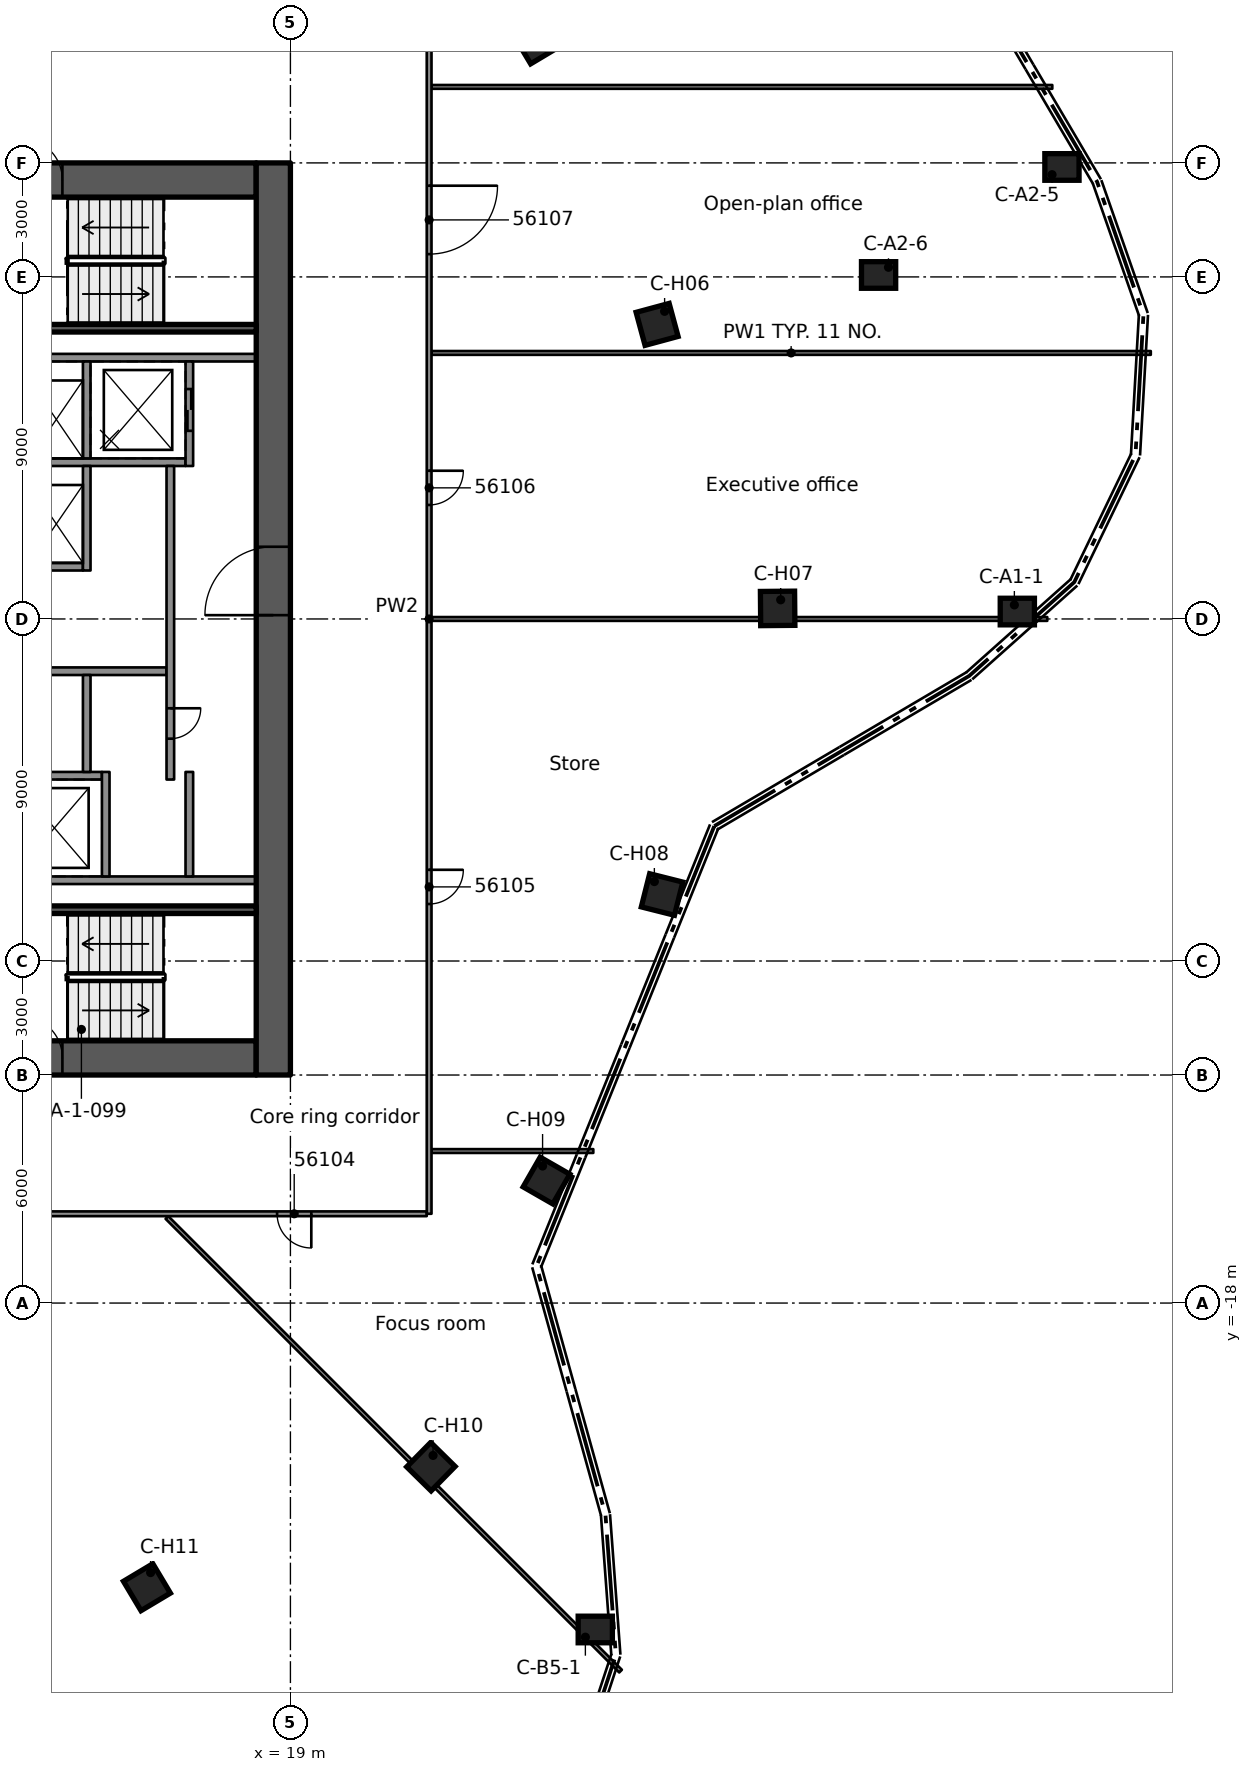
"""IFC4 building model, lengths in metres.
Left out: names, types, materials, properties, quantities, classifications, styles, units other than length and angle.
Written with IfcOpenShell. Run it as: python <this file> out.ifc"""

import sys

from ifc_helpers import new_model, si_unit, direction, frame, frame_2d, origin, origin_2d, place, context, subcontext, project, spatial, rectangle, extrude, element, fill, save


model = new_model("IFC4")
c1 = context("Model", 3, precision=1e-05, world=origin(), true_north=direction((0.0, 1.0)))
c2 = subcontext(c1, "Body", "Model", "MODEL_VIEW")
j1 = project(units=[si_unit("LENGTHUNIT", "METRE"), si_unit("PLANEANGLEUNIT", "RADIAN")], contexts=[c1])
p1 = place(None, origin())
s1 = spatial("IfcSite", under=j1, at=p1, CompositionType="ELEMENT")
p2 = place(p1, origin())
s2 = spatial("IfcBuilding", under=s1, at=p2, CompositionType="ELEMENT")
p3 = place(p2, frame((0.0, 0.0, 278.9)))
s3 = spatial("IfcBuildingStorey", under=s2, at=p3, CompositionType="ELEMENT", Elevation=278.9)
p4 = place(p3, frame((8.9, 11.55, 0.0), z_axis=(0.0, 0.0, 1.0), x_axis=(1.0, 0.0, 0.0)))
e1 = element("IfcWall", 1, at=p4, inside=s3, PredefinedType="SHEAR", context=c2, shape_type="SweptSolid", body=[
    extrude(rectangle(XDim=9.2, YDim=0.9, at=frame_2d((4.6, 0.0))), origin(), (0.0, 0.0, 1.0), 3.5),
])
p5 = place(p4, frame((3.0, 0.0, 0.0)))
e2 = element("IfcOpeningElement", 2, at=p5, cuts=e1, PredefinedType="OPENING", context=c2, shape_type="SweptSolid", body=[
    extrude(rectangle(XDim=1.1, YDim=2.1, at=frame_2d((0.55, 1.05))), frame((0.0, 0.46, 0.0), z_axis=(0.0, -1.0, 0.0), x_axis=(1.0, 0.0, 0.0)), (0.0, 0.0, 1.0), 0.92),
])
p6 = place(p3, frame((8.9, -11.55, 0.0), z_axis=(0.0, 0.0, 1.0), x_axis=(1.0, 0.0, 0.0)))
e3 = element("IfcWall", 3, at=p6, inside=s3, PredefinedType="SHEAR", context=c2, shape_type="SweptSolid", body=[
    extrude(rectangle(XDim=9.2, YDim=0.9, at=frame_2d((4.6, 0.0))), origin(), (0.0, 0.0, 1.0), 3.5),
])
p7 = place(p6, frame((3.0, 0.0, 0.0)))
e4 = element("IfcOpeningElement", 4, at=p7, cuts=e3, PredefinedType="OPENING", context=c2, shape_type="SweptSolid", body=[
    extrude(rectangle(XDim=1.1, YDim=2.1, at=frame_2d((0.55, 1.05))), frame((0.0, 0.46, 0.0), z_axis=(0.0, -1.0, 0.0), x_axis=(1.0, 0.0, 0.0)), (0.0, 0.0, 1.0), 0.92),
])
p8 = place(p3, frame((18.55, -12.0, 0.0), z_axis=(0.0, 0.0, 1.0), x_axis=(0.0, 1.0, 0.0)))
e5 = element("IfcWall", 5, at=p8, inside=s3, PredefinedType="SHEAR", context=c2, shape_type="SweptSolid", body=[
    extrude(rectangle(XDim=24.0, YDim=0.9, at=frame_2d((12.0, 0.0))), origin(), (0.0, 0.0, 1.0), 3.5),
])
p9 = place(p8, frame((12.1, 0.0, 0.0)))
e6 = element("IfcOpeningElement", 6, at=p9, cuts=e5, PredefinedType="OPENING", context=c2, shape_type="SweptSolid", body=[
    extrude(rectangle(XDim=1.8, YDim=2.1, at=frame_2d((0.9, 1.05))), frame((0.0, 0.46, 0.0), z_axis=(0.0, -1.0, 0.0), x_axis=(1.0, 0.0, 0.0)), (0.0, 0.0, 1.0), 0.92),
])
for number, where, z_axis, x_axis in (
    (7, (38.128, 0.195, 0.0), (0.0, 0.0, 1.0), (1.0, 0.0, 0.0)),
    (8, (39.302, 11.893, 0.0), (0.0, 0.0, 1.0), (1.0, 0.0, 0.0)),
    (9, (34.477, 9.051, 0.0), (0.0, 0.0, 1.0), (1.0, 0.0, 0.0)),
    (10, (27.022, -26.589, 0.0), (0.0, 0.0, 1.0), (1.0, 0.0, 0.0)),
):
    element("IfcColumn", number, at=place(p3, frame(where, z_axis=z_axis, x_axis=x_axis)), inside=s3, PredefinedType="COLUMN", context=c2, shape_type="SweptSolid", body=[
        extrude(rectangle(XDim=0.9, YDim=0.7, at=origin_2d()), origin(), (0.0, 0.0, 1.0), 3.5),
    ])
for number, where, z_axis, x_axis in (
    (11, (25.477, 15.224, 0.0), (0.0, 0.0, 1.0), (0.858, 0.513, 0.0)),
    (12, (28.649, 7.751, 0.0), (0.0, 0.0, 1.0), (0.965, 0.261, 0.0)),
    (13, (31.821, 0.278, 0.0), (0.0, 0.0, 1.0), (1.0, 0.009, 0.0)),
    (14, (28.78, -7.25, 0.0), (0.0, 0.0, 1.0), (0.97, -0.244, 0.0)),
    (15, (25.739, -14.777, 0.0), (0.0, 0.0, 1.0), (0.867, -0.498, 0.0)),
    (16, (22.697, -22.305, 0.0), (0.0, 0.0, 1.0), (0.713, -0.701, 0.0)),
    (17, (15.224, -25.477, 0.0), (0.0, 0.0, 1.0), (0.513, -0.858, 0.0)),
):
    element("IfcColumn", number, at=place(p3, frame(where, z_axis=z_axis, x_axis=x_axis)), inside=s3, PredefinedType="COLUMN", context=c2, shape_type="SweptSolid", body=[
        extrude(rectangle(XDim=0.9, YDim=0.9, at=origin_2d()), origin(), (0.0, 0.0, 1.0), 3.5),
    ])
for number, where, z_axis, x_axis in (
    (18, (11.54, -6.875, 0.0), (0.0, 0.0, 1.0), (1.0, 0.0, 0.0)),
    (19, (11.54, 6.875, 0.0), (0.0, 0.0, 1.0), (1.0, 0.0, 0.0)),
):
    element("IfcWall", number, at=place(p3, frame(where, z_axis=z_axis, x_axis=x_axis)), inside=s3, PredefinedType="SOLIDWALL", context=c2, shape_type="SweptSolid", body=[
        extrude(rectangle(XDim=6.56, YDim=0.2, at=frame_2d((3.28, 0.0))), origin(), (0.0, 0.0, 1.0), 3.09),
    ])
p10 = place(p3, frame((11.54, 4.125, 0.0), z_axis=(0.0, 0.0, 1.0), x_axis=(1.0, 0.0, 0.0)))
e20 = element("IfcWall", 20, at=p10, inside=s3, PredefinedType="SOLIDWALL", context=c2, shape_type="SweptSolid", body=[
    extrude(rectangle(XDim=4.7, YDim=0.2, at=frame_2d((2.35, 0.0))), origin(), (0.0, 0.0, 1.0), 3.09),
])
p11 = place(p3, frame((11.54, 1.375, 0.0), z_axis=(0.0, 0.0, 1.0), x_axis=(1.0, 0.0, 0.0)))
e21 = element("IfcWall", 21, at=p11, inside=s3, PredefinedType="SOLIDWALL", context=c2, shape_type="SweptSolid", body=[
    extrude(rectangle(XDim=2.0, YDim=0.2, at=frame_2d((1.0, 0.0))), origin(), (0.0, 0.0, 1.0), 3.09),
])
p12 = place(p3, frame((11.54, -1.375, 0.0), z_axis=(0.0, 0.0, 1.0), x_axis=(1.0, 0.0, 0.0)))
e22 = element("IfcWall", 22, at=p12, inside=s3, PredefinedType="SOLIDWALL", context=c2, shape_type="SweptSolid", body=[
    extrude(rectangle(XDim=4.2, YDim=0.2, at=frame_2d((2.1, 0.0))), origin(), (0.0, 0.0, 1.0), 3.09),
])
p13 = place(p3, frame((11.54, -4.125, 0.0), z_axis=(0.0, 0.0, 1.0), x_axis=(1.0, 0.0, 0.0)))
e23 = element("IfcWall", 23, at=p13, inside=s3, PredefinedType="SOLIDWALL", context=c2, shape_type="SweptSolid", body=[
    extrude(rectangle(XDim=2.5, YDim=0.2, at=frame_2d((1.25, 0.0))), origin(), (0.0, 0.0, 1.0), 3.09),
])
p14 = place(p3, frame((13.64, 6.775, 0.0), z_axis=(0.0, 0.0, 1.0), x_axis=(0.0, -1.0, 0.0)))
e24 = element("IfcWall", 24, at=p14, inside=s3, PredefinedType="SOLIDWALL", context=c2, shape_type="SweptSolid", body=[
    extrude(rectangle(XDim=2.55, YDim=0.2, at=frame_2d((1.275, 0.0))), origin(), (0.0, 0.0, 1.0), 3.09),
])
p15 = place(p3, frame((13.64, 4.025, 0.0), z_axis=(0.0, 0.0, 1.0), x_axis=(0.0, -1.0, 0.0)))
e25 = element("IfcWall", 25, at=p15, inside=s3, PredefinedType="SOLIDWALL", context=c2, shape_type="SweptSolid", body=[
    extrude(rectangle(XDim=2.75, YDim=0.2, at=frame_2d((1.375, 0.0))), origin(), (0.0, 0.0, 1.0), 3.09),
])
p16 = place(p3, frame((13.64, -1.475, 0.0), z_axis=(0.0, 0.0, 1.0), x_axis=(0.0, -1.0, 0.0)))
e26 = element("IfcWall", 26, at=p16, inside=s3, PredefinedType="SOLIDWALL", context=c2, shape_type="SweptSolid", body=[
    extrude(rectangle(XDim=2.55, YDim=0.2, at=frame_2d((1.275, 0.0))), origin(), (0.0, 0.0, 1.0), 3.09),
])
p17 = place(p3, frame((14.14, -4.025, 0.0), z_axis=(0.0, 0.0, 1.0), x_axis=(0.0, -1.0, 0.0)))
e27 = element("IfcWall", 27, at=p17, inside=s3, PredefinedType="SOLIDWALL", context=c2, shape_type="SweptSolid", body=[
    extrude(rectangle(XDim=2.75, YDim=0.2, at=frame_2d((1.375, 0.0))), origin(), (0.0, 0.0, 1.0), 3.09),
])
p18 = place(p3, frame((16.34, 6.775, 0.0), z_axis=(0.0, 0.0, 1.0), x_axis=(0.0, -1.0, 0.0)))
e28 = element("IfcWall", 28, at=p18, inside=s3, PredefinedType="SOLIDWALL", context=c2, shape_type="SweptSolid", body=[
    extrude(rectangle(XDim=2.75, YDim=0.2, at=frame_2d((1.375, 0.0))), origin(), (0.0, 0.0, 1.0), 3.09),
])
p19 = place(p18, frame((0.725, 0.0, 0.0)))
e29 = element("IfcOpeningElement", 29, at=p19, cuts=e28, PredefinedType="OPENING", context=c2, shape_type="SweptSolid", body=[
    extrude(rectangle(XDim=1.1, YDim=2.1, at=frame_2d((0.55, 1.05))), frame((0.0, 0.11, 0.0), z_axis=(0.0, -1.0, 0.0), x_axis=(1.0, 0.0, 0.0)), (0.0, 0.0, 1.0), 0.22),
])
p20 = place(p3, frame((15.84, 4.025, 0.0), z_axis=(0.0, 0.0, 1.0), x_axis=(0.0, -1.0, 0.0)))
e30 = element("IfcWall", 30, at=p20, inside=s3, PredefinedType="SOLIDWALL", context=c2, shape_type="SweptSolid", body=[
    extrude(rectangle(XDim=8.25, YDim=0.2, at=frame_2d((4.125, 0.0))), origin(), (0.0, 0.0, 1.0), 3.09),
])
p21 = place(p20, frame((6.375, 0.0, 0.0)))
e31 = element("IfcOpeningElement", 31, at=p21, cuts=e30, PredefinedType="OPENING", context=c2, shape_type="SweptSolid", body=[
    extrude(rectangle(XDim=0.8, YDim=2.1, at=frame_2d((0.4, 1.05))), frame((0.0, 0.11, 0.0), z_axis=(0.0, -1.0, 0.0), x_axis=(1.0, 0.0, 0.0)), (0.0, 0.0, 1.0), 0.22),
])
p22 = place(p3, frame((16.34, -4.025, 0.0), z_axis=(0.0, 0.0, 1.0), x_axis=(0.0, -1.0, 0.0)))
e32 = element("IfcWall", 32, at=p22, inside=s3, PredefinedType="SOLIDWALL", context=c2, shape_type="SweptSolid", body=[
    extrude(rectangle(XDim=2.75, YDim=0.2, at=frame_2d((1.375, 0.0))), origin(), (0.0, 0.0, 1.0), 3.09),
])
for number, where, z_axis, x_axis in (
    (33, (11.54, -7.65, 0.0), (0.0, 0.0, 1.0), (1.0, 0.0, 0.0)),
    (34, (11.54, 7.65, 0.0), (0.0, 0.0, 1.0), (1.0, 0.0, 0.0)),
):
    element("IfcWall", number, at=place(p3, frame(where, z_axis=z_axis, x_axis=x_axis)), inside=s3, PredefinedType="SOLIDWALL", context=c2, shape_type="SweptSolid", body=[
        extrude(rectangle(XDim=6.56, YDim=0.2, at=frame_2d((3.28, 0.0))), origin(), (0.0, 0.0, 1.0), 3.09),
    ])
p23 = place(p3, frame((27.687, -27.685, 0.0), z_axis=(0.0, 0.0, 1.0), x_axis=(-0.70713570585, 0.70707785534, 0.0)))
e35 = element("IfcWall", 35, at=p23, inside=s3, PredefinedType="PARTITIONING", context=c2, shape_type="SweptSolid", body=[
    extrude(rectangle(XDim=16.881, YDim=0.1, at=frame_2d((8.44, 0.0))), origin(), (0.0, 0.0, 1.0), 3.08),
])
p24 = place(p3, frame((22.587, -15.651, 0.0), z_axis=(0.0, 0.0, 1.0), x_axis=(-1.0, 0.0, 0.0)))
e36 = element("IfcWall", 36, at=p24, inside=s3, PredefinedType="PARTITIONING", context=c2, shape_type="SweptSolid", body=[
    extrude(rectangle(XDim=10.996, YDim=0.125, at=frame_2d((5.498, 0.0))), origin(), (0.0, 0.0, 1.0), 3.08),
])
p25 = place(p24, frame((3.038, 0.0, 0.0)))
e37 = element("IfcOpeningElement", 37, at=p25, cuts=e36, PredefinedType="OPENING", context=c2, shape_type="SweptSolid", body=[
    extrude(rectangle(XDim=0.9, YDim=2.1, at=frame_2d((0.45, 1.05))), frame((0.0, 0.073, 0.0), z_axis=(0.0, -1.0, 0.0), x_axis=(1.0, 0.0, 0.0)), (0.0, 0.0, 1.0), 0.145),
])
p26 = place(p3, frame((22.712, -14.0, 0.0), z_axis=(0.0, 0.0, 1.0), x_axis=(1.0, 0.0, 0.0)))
e38 = element("IfcWall", 38, at=p26, inside=s3, PredefinedType="PARTITIONING", context=c2, shape_type="SweptSolid", body=[
    extrude(rectangle(XDim=4.258, YDim=0.1, at=frame_2d((2.129, 0.0))), origin(), (0.0, 0.0, 1.0), 3.08),
])
p27 = place(p3, frame((22.712, 0.0, 0.0), z_axis=(0.0, 0.0, 1.0), x_axis=(1.0, 0.0, 0.0)))
e39 = element("IfcWall", 39, at=p27, inside=s3, PredefinedType="PARTITIONING", context=c2, shape_type="SweptSolid", body=[
    extrude(rectangle(XDim=16.204, YDim=0.1, at=frame_2d((8.102, 0.0))), origin(), (0.0, 0.0, 1.0), 3.08),
])
p28 = place(p3, frame((22.712, 7.0, 0.0), z_axis=(0.0, 0.0, 1.0), x_axis=(1.0, 0.0, 0.0)))
e40 = element("IfcWall", 40, at=p28, inside=s3, PredefinedType="PARTITIONING", context=c2, shape_type="SweptSolid", body=[
    extrude(rectangle(XDim=18.928, YDim=0.1, at=frame_2d((9.464, 0.0))), origin(), (0.0, 0.0, 1.0), 3.08),
])
p29 = place(p3, frame((22.712, 14.0, 0.0), z_axis=(0.0, 0.0, 1.0), x_axis=(1.0, 0.0, 0.0)))
e41 = element("IfcWall", 41, at=p29, inside=s3, PredefinedType="PARTITIONING", context=c2, shape_type="SweptSolid", body=[
    extrude(rectangle(XDim=16.336, YDim=0.1, at=frame_2d((8.168, 0.0))), origin(), (0.0, 0.0, 1.0), 3.08),
])
p30 = place(p3, frame((22.65, 15.651, 0.0), z_axis=(0.0, 0.0, 1.0), x_axis=(0.0, -1.0, 0.0)))
e42 = element("IfcWall", 42, at=p30, inside=s3, PredefinedType="PARTITIONING", context=c2, shape_type="SweptSolid", body=[
    extrude(rectangle(XDim=31.302, YDim=0.125, at=frame_2d((15.651, 0.0))), origin(), (0.0, 0.0, 1.0), 3.08),
])
p31 = place(p30, frame((22.251, 0.0, 0.0)))
e43 = element("IfcOpeningElement", 43, at=p31, cuts=e42, PredefinedType="OPENING", context=c2, shape_type="SweptSolid", body=[
    extrude(rectangle(XDim=0.9, YDim=2.1, at=frame_2d((0.45, 1.05))), frame((0.0, 0.073, 0.0), z_axis=(0.0, -1.0, 0.0), x_axis=(1.0, 0.0, 0.0)), (0.0, 0.0, 1.0), 0.145),
])
p32 = place(p30, frame((11.751, 0.0, 0.0)))
e44 = element("IfcOpeningElement", 44, at=p32, cuts=e42, PredefinedType="OPENING", context=c2, shape_type="SweptSolid", body=[
    extrude(rectangle(XDim=0.9, YDim=2.1, at=frame_2d((0.45, 1.05))), frame((0.0, 0.073, 0.0), z_axis=(0.0, -1.0, 0.0), x_axis=(1.0, 0.0, 0.0)), (0.0, 0.0, 1.0), 0.145),
])
p33 = place(p30, frame((4.251, 0.0, 0.0)))
e45 = element("IfcOpeningElement", 45, at=p33, cuts=e42, PredefinedType="OPENING", context=c2, shape_type="SweptSolid", body=[
    extrude(rectangle(XDim=1.8, YDim=2.1, at=frame_2d((0.9, 1.05))), frame((0.0, 0.073, 0.0), z_axis=(0.0, -1.0, 0.0), x_axis=(1.0, 0.0, 0.0)), (0.0, 0.0, 1.0), 0.145),
])
p34 = place(p19, origin())
e46 = element("IfcDoor", 46, at=p34, inside=s3, OperationType="DOUBLE_DOOR_SLIDING", PredefinedType="DOOR", context=c2, shape_type="SweptSolid", body=[
    extrude(rectangle(XDim=1.1, YDim=2.1, at=frame_2d((0.55, 1.05))), frame((0.0, 0.025, 0.0), z_axis=(0.0, -1.0, 0.0), x_axis=(1.0, 0.0, 0.0)), (0.0, 0.0, 1.0), 0.05),
])
fill(e29, e46)
p35 = place(p21, origin())
e47 = element("IfcDoor", 47, at=p35, inside=s3, OperationType="SINGLE_SWING_LEFT", PredefinedType="DOOR", context=c2, shape_type="SweptSolid", body=[
    extrude(rectangle(XDim=0.8, YDim=2.1, at=frame_2d((0.4, 1.05))), frame((0.0, 0.025, 0.0), z_axis=(0.0, -1.0, 0.0), x_axis=(1.0, 0.0, 0.0)), (0.0, 0.0, 1.0), 0.05),
])
fill(e31, e47)
p36 = place(p9, origin())
e48 = element("IfcDoor", 48, at=p36, inside=s3, OperationType="SINGLE_SWING_RIGHT", PredefinedType="DOOR", context=c2, shape_type="SweptSolid", body=[
    extrude(rectangle(XDim=1.8, YDim=2.1, at=frame_2d((0.9, 1.05))), frame((0.0, 0.025, 0.0), z_axis=(0.0, -1.0, 0.0), x_axis=(1.0, 0.0, 0.0)), (0.0, 0.0, 1.0), 0.05),
])
fill(e6, e48)
p37 = place(p7, origin())
e49 = element("IfcDoor", 49, at=p37, inside=s3, OperationType="SINGLE_SWING_LEFT", PredefinedType="DOOR", context=c2, shape_type="SweptSolid", body=[
    extrude(rectangle(XDim=1.1, YDim=2.1, at=frame_2d((0.55, 1.05))), frame((0.0, 0.025, 0.0), z_axis=(0.0, -1.0, 0.0), x_axis=(1.0, 0.0, 0.0)), (0.0, 0.0, 1.0), 0.05),
])
fill(e4, e49)
p38 = place(p5, origin())
e50 = element("IfcDoor", 50, at=p38, inside=s3, OperationType="SINGLE_SWING_LEFT", PredefinedType="DOOR", context=c2, shape_type="SweptSolid", body=[
    extrude(rectangle(XDim=1.1, YDim=2.1, at=frame_2d((0.55, 1.05))), frame((0.0, 0.025, 0.0), z_axis=(0.0, -1.0, 0.0), x_axis=(1.0, 0.0, 0.0)), (0.0, 0.0, 1.0), 0.05),
])
fill(e2, e50)
p39 = place(p25, origin())
e51 = element("IfcDoor", 51, at=p39, inside=s3, OperationType="SINGLE_SWING_LEFT", PredefinedType="DOOR", context=c2, shape_type="SweptSolid", body=[
    extrude(rectangle(XDim=0.9, YDim=2.1, at=frame_2d((0.45, 1.05))), frame((0.0, 0.025, 0.0), z_axis=(0.0, -1.0, 0.0), x_axis=(1.0, 0.0, 0.0)), (0.0, 0.0, 1.0), 0.05),
])
fill(e37, e51)
p40 = place(p31, origin())
e52 = element("IfcDoor", 52, at=p40, inside=s3, OperationType="SINGLE_SWING_RIGHT", PredefinedType="DOOR", context=c2, shape_type="SweptSolid", body=[
    extrude(rectangle(XDim=0.9, YDim=2.1, at=frame_2d((0.45, 1.05))), frame((0.0, 0.025, 0.0), z_axis=(0.0, -1.0, 0.0), x_axis=(1.0, 0.0, 0.0)), (0.0, 0.0, 1.0), 0.05),
])
fill(e43, e52)
p41 = place(p32, origin())
e53 = element("IfcDoor", 53, at=p41, inside=s3, OperationType="SINGLE_SWING_LEFT", PredefinedType="DOOR", context=c2, shape_type="SweptSolid", body=[
    extrude(rectangle(XDim=0.9, YDim=2.1, at=frame_2d((0.45, 1.05))), frame((0.0, 0.025, 0.0), z_axis=(0.0, -1.0, 0.0), x_axis=(1.0, 0.0, 0.0)), (0.0, 0.0, 1.0), 0.05),
])
fill(e44, e53)
p42 = place(p33, origin())
e54 = element("IfcDoor", 54, at=p42, inside=s3, OperationType="DOUBLE_DOOR_SINGLE_SWING", PredefinedType="DOOR", context=c2, shape_type="SweptSolid", body=[
    extrude(rectangle(XDim=1.8, YDim=2.1, at=frame_2d((0.9, 1.05))), frame((0.0, 0.025, 0.0), z_axis=(0.0, -1.0, 0.0), x_axis=(1.0, 0.0, 0.0)), (0.0, 0.0, 1.0), 0.05),
])
fill(e45, e54)
save(model, sys.argv[1])
